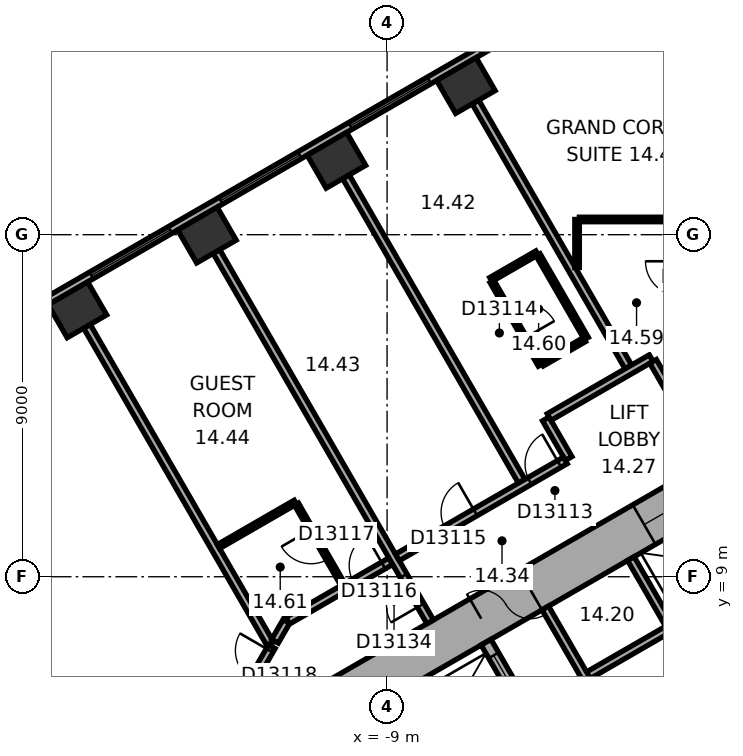
"""IFC4 building model, lengths in metres.
Left out: names, types, materials, properties, quantities, classifications, styles, units other than length and angle.
Written with IfcOpenShell. Run it as: python <this file> out.ifc"""

import sys

from ifc_helpers import new_model, si_unit, direction, frame, frame_2d, origin, origin_2d, place, context, subcontext, project, spatial, rectangle, extrude, element, fill, save


model = new_model("IFC4")
c1 = context("Model", 3, precision=1e-05, world=origin(), true_north=direction((0.0, 1.0)))
c2 = subcontext(c1, "Body", "Model", "MODEL_VIEW")
j1 = project(units=[si_unit("LENGTHUNIT", "METRE"), si_unit("PLANEANGLEUNIT", "RADIAN")], contexts=[c1])
p1 = place(None, origin())
s1 = spatial("IfcSite", under=j1, at=p1, CompositionType="ELEMENT")
p2 = place(p1, origin())
s2 = spatial("IfcBuilding", under=s1, at=p2, CompositionType="ELEMENT")
p3 = place(p2, frame((0.0, 0.0, 67.1)))
s3 = spatial("IfcBuildingStorey", under=s2, at=p3, CompositionType="ELEMENT", Elevation=67.1)
for number, where, z_axis, x_axis in (
    (1, (-6.926, 21.925, 0.0), (0.0, 0.0, 1.0), (-0.866, -0.5, 0.0)),
    (2, (-10.333, 19.957, 0.0), (0.0, 0.0, 1.0), (-0.866, -0.5, 0.0)),
    (3, (-13.74, 17.99, 0.0), (0.0, 0.0, 1.0), (-0.866, -0.5, 0.0)),
    (4, (-17.148, 16.023, 0.0), (0.0, 0.0, 1.0), (-0.866, -0.5, 0.0)),
):
    element("IfcColumn", number, at=place(p3, frame(where, z_axis=z_axis, x_axis=x_axis)), inside=s3, PredefinedType="COLUMN", context=c2, shape_type="SweptSolid", body=[
        extrude(rectangle(XDim=1.2, YDim=1.0, at=origin_2d()), origin(), (0.0, 0.0, 1.0), 3.3),
    ])
p4 = place(p3, frame((0.3, 11.836, 0.0), z_axis=(0.0, 0.0, 1.0), x_axis=(-0.866021384402, -0.500006961711, 0.0)))
e5 = element("IfcWall", 5, at=p4, inside=s3, PredefinedType="SHEAR", context=c2, shape_type="SweptSolid", body=[
    extrude(rectangle(XDim=12.355, YDim=1.2, at=frame_2d((6.178, 0.0))), origin(), (0.0, 0.0, 1.0), 3.3),
])
p5 = place(p4, frame((6.378, 0.0, 0.0)))
e6 = element("IfcOpeningElement", 6, at=p5, cuts=e5, PredefinedType="OPENING", context=c2, shape_type="SweptSolid", body=[
    extrude(rectangle(XDim=1.5, YDim=2.1, at=frame_2d((0.75, 1.05))), frame((0.0, 0.61, 0.0), z_axis=(0.0, -1.0, 0.0), x_axis=(1.0, 0.0, 0.0)), (0.0, 0.0, 1.0), 1.22),
])
p6 = place(p4, frame((1.828, 0.0, 0.0)))
e7 = element("IfcOpeningElement", 7, at=p6, cuts=e5, PredefinedType="OPENING", context=c2, shape_type="SweptSolid", body=[
    extrude(rectangle(XDim=1.1, YDim=2.1, at=frame_2d((0.55, 1.05))), frame((0.0, 0.61, 0.0), z_axis=(0.0, -1.0, 0.0), x_axis=(1.0, 0.0, 0.0)), (0.0, 0.0, 1.0), 1.22),
])
p7 = place(p3, frame((-3.136, 24.805, 0.0), z_axis=(0.0, 0.0, 1.0), x_axis=(-0.866028291626, -0.499994998079, 0.0)))
e8 = element("IfcWall", 8, at=p7, inside=s3, PredefinedType="STANDARD", context=c2, shape_type="SweptSolid", body=[
    extrude(rectangle(XDim=21.246, YDim=0.2, at=frame_2d((10.623, 0.0))), origin(), (0.0, 0.0, 1.0), 3.3),
])
p8 = place(p7, frame((1.555, 0.0, 0.8)))
e9 = element("IfcOpeningElement", 9, at=p8, cuts=e8, PredefinedType="OPENING", context=c2, shape_type="SweptSolid", body=[
    extrude(rectangle(XDim=2.4, YDim=1.7, at=frame_2d((1.2, 0.85))), frame((0.0, 0.11, 0.0), z_axis=(0.0, -1.0, 0.0), x_axis=(1.0, 0.0, 0.0)), (0.0, 0.0, 1.0), 0.22),
])
p9 = place(p7, frame((5.489, 0.0, 0.8)))
e10 = element("IfcOpeningElement", 10, at=p9, cuts=e8, PredefinedType="OPENING", context=c2, shape_type="SweptSolid", body=[
    extrude(rectangle(XDim=2.4, YDim=1.7, at=frame_2d((1.2, 0.85))), frame((0.0, 0.11, 0.0), z_axis=(0.0, -1.0, 0.0), x_axis=(1.0, 0.0, 0.0)), (0.0, 0.0, 1.0), 0.22),
])
p10 = place(p7, frame((9.424, 0.0, 0.8)))
e11 = element("IfcOpeningElement", 11, at=p10, cuts=e8, PredefinedType="OPENING", context=c2, shape_type="SweptSolid", body=[
    extrude(rectangle(XDim=2.4, YDim=1.7, at=frame_2d((1.2, 0.85))), frame((0.0, 0.11, 0.0), z_axis=(0.0, -1.0, 0.0), x_axis=(1.0, 0.0, 0.0)), (0.0, 0.0, 1.0), 0.22),
])
p11 = place(p7, frame((13.358, 0.0, 0.8)))
e12 = element("IfcOpeningElement", 12, at=p11, cuts=e8, PredefinedType="OPENING", context=c2, shape_type="SweptSolid", body=[
    extrude(rectangle(XDim=2.4, YDim=1.7, at=frame_2d((1.2, 0.85))), frame((0.0, 0.11, 0.0), z_axis=(0.0, -1.0, 0.0), x_axis=(1.0, 0.0, 0.0)), (0.0, 0.0, 1.0), 0.22),
])
p12 = place(p7, frame((17.293, 0.0, 0.8)))
e13 = element("IfcOpeningElement", 13, at=p12, cuts=e8, PredefinedType="OPENING", context=c2, shape_type="SweptSolid", body=[
    extrude(rectangle(XDim=2.4, YDim=1.7, at=frame_2d((1.2, 0.85))), frame((0.0, 0.11, 0.0), z_axis=(0.0, -1.0, 0.0), x_axis=(1.0, 0.0, 0.0)), (0.0, 0.0, 1.0), 0.22),
])
p13 = place(p3, frame((0.803, 9.009, 0.0), z_axis=(0.0, 0.0, 1.0), x_axis=(-0.866028230842, -0.499995103361, 0.0)))
e14 = element("IfcWall", 14, at=p13, inside=s3, PredefinedType="PARTITIONING", context=c2, shape_type="SweptSolid", body=[
    extrude(rectangle(XDim=5.4, YDim=0.2, at=frame_2d((2.7, 0.0))), origin(), (0.0, 0.0, 1.0), 3.05),
])
for number, where, z_axis, x_axis in (
    (15, (-1.485, 7.572, 0.0), (0.0, 0.0, 1.0), (-0.5, 0.866, 0.0)),
    (16, (-3.737, 6.272, 0.0), (0.0, 0.0, 1.0), (-0.5, 0.866, 0.0)),
):
    element("IfcWall", number, at=place(p3, frame(where, z_axis=z_axis, x_axis=x_axis)), inside=s3, PredefinedType="PARTITIONING", context=c2, shape_type="SweptSolid", body=[
        extrude(rectangle(XDim=2.2, YDim=0.2, at=frame_2d((1.1, 0.0))), origin(), (0.0, 0.0, 1.0), 3.05),
    ])
p14 = place(p3, frame((-2.216, 4.282, 0.0), z_axis=(0.0, 0.0, 1.0), x_axis=(0.499977259774, 0.866038532462, 0.0)))
e17 = element("IfcWall", 17, at=p14, inside=s3, PredefinedType="SHEAR", context=c2, shape_type="SweptSolid", body=[
    extrude(rectangle(XDim=4.7, YDim=0.3, at=frame_2d((2.35, 0.0))), origin(), (0.0, 0.0, 1.0), 3.05),
])
p15 = place(p3, frame((-5.295, 5.372, 0.0), z_axis=(0.0, 0.0, 1.0), x_axis=(-0.500077893725, 0.86598042715, 0.0)))
e18 = element("IfcWall", 18, at=p15, inside=s3, PredefinedType="SHEAR", context=c2, shape_type="SweptSolid", body=[
    extrude(rectangle(XDim=2.2, YDim=0.3, at=frame_2d((1.1, 0.0))), origin(), (0.0, 0.0, 1.0), 3.05),
])
p16 = place(p15, frame((0.7, 0.0, 0.0)))
e19 = element("IfcOpeningElement", 19, at=p16, cuts=e18, PredefinedType="OPENING", context=c2, shape_type="SweptSolid", body=[
    extrude(rectangle(XDim=1.1, YDim=2.1, at=frame_2d((0.55, 1.05))), frame((0.0, 0.16, 0.0), z_axis=(0.0, -1.0, 0.0), x_axis=(1.0, 0.0, 0.0)), (0.0, 0.0, 1.0), 0.32),
])
p17 = place(p3, frame((-16.898, 15.59, 0.0), z_axis=(0.0, 0.0, 1.0), x_axis=(0.499994742786, -0.866028439017, 0.0)))
e20 = element("IfcWall", 20, at=p17, inside=s3, PredefinedType="PARTITIONING", context=c2, shape_type="SweptSolid", body=[
    extrude(rectangle(XDim=9.65, YDim=0.2, at=frame_2d((4.825, 0.0))), origin(), (0.0, 0.0, 1.0), 3.05),
])
p18 = place(p3, frame((-13.436, 9.794, 0.0), z_axis=(0.0, 0.0, 1.0), x_axis=(0.866053246676, 0.499951771596, 0.0)))
e21 = element("IfcWall", 21, at=p18, inside=s3, PredefinedType="PARTITIONING", context=c2, shape_type="SweptSolid", body=[
    extrude(rectangle(XDim=2.335, YDim=0.12, at=frame_2d((1.167, 0.0))), origin(), (0.0, 0.0, 1.0), 3.05),
])
p19 = place(p3, frame((-12.032, 7.162, 0.0), z_axis=(0.0, 0.0, 1.0), x_axis=(-0.499951829968, -0.866053212979, 0.0)))
e22 = element("IfcWall", 22, at=p19, inside=s3, PredefinedType="PARTITIONING", context=c2, shape_type="SweptSolid", body=[
    extrude(rectangle(XDim=1.136, YDim=0.2, at=frame_2d((0.568, 0.0))), origin(), (0.0, 0.0, 1.0), 3.05),
])
p20 = place(p19, frame((0.118, 0.0, 0.0)))
e23 = element("IfcOpeningElement", 23, at=p20, cuts=e22, PredefinedType="OPENING", context=c2, shape_type="SweptSolid", body=[
    extrude(rectangle(XDim=0.9, YDim=2.1, at=frame_2d((0.45, 1.05))), frame((0.0, 0.11, 0.0), z_axis=(0.0, -1.0, 0.0), x_axis=(1.0, 0.0, 0.0)), (0.0, 0.0, 1.0), 0.22),
])
p21 = place(p3, frame((-11.65, 7.823, 0.0), z_axis=(0.0, 0.0, 1.0), x_axis=(-0.50012165622, -0.865955154139, 0.0)))
e24 = element("IfcWall", 24, at=p21, inside=s3, PredefinedType="PARTITIONING", context=c2, shape_type="SweptSolid", body=[
    extrude(rectangle(XDim=0.6, YDim=0.2, at=frame_2d((0.3, 0.0))), origin(), (0.0, 0.0, 1.0), 3.05),
])
p22 = place(p3, frame((-11.385, 10.909, 0.0), z_axis=(0.0, 0.0, 1.0), x_axis=(0.500077547548, -0.865980627057, 0.0)))
e25 = element("IfcWall", 25, at=p22, inside=s3, PredefinedType="PARTITIONING", context=c2, shape_type="SweptSolid", body=[
    extrude(rectangle(XDim=2.44, YDim=0.12, at=frame_2d((1.22, 0.0))), origin(), (0.0, 0.0, 1.0), 3.05),
])
p23 = place(p22, frame((0.77, 0.0, 0.0)))
e26 = element("IfcOpeningElement", 26, at=p23, cuts=e25, PredefinedType="OPENING", context=c2, shape_type="SweptSolid", body=[
    extrude(rectangle(XDim=0.9, YDim=2.1, at=frame_2d((0.45, 1.05))), frame((0.0, 0.07, 0.0), z_axis=(0.0, -1.0, 0.0), x_axis=(1.0, 0.0, 0.0)), (0.0, 0.0, 1.0), 0.14),
])
p24 = place(p3, frame((-10.083, 19.524, 0.0), z_axis=(0.0, 0.0, 1.0), x_axis=(0.499999662836, -0.866025598446, 0.0)))
e27 = element("IfcWall", 27, at=p24, inside=s3, PredefinedType="PARTITIONING", context=c2, shape_type="SweptSolid", body=[
    extrude(rectangle(XDim=9.25, YDim=0.2, at=frame_2d((4.625, 0.0))), origin(), (0.0, 0.0, 1.0), 2.6),
])
p25 = place(p3, frame((-8.902, 9.41, 0.0), z_axis=(0.0, 0.0, 1.0), x_axis=(-0.866014299198, -0.500019233215, 0.0)))
e28 = element("IfcWall", 28, at=p25, inside=s3, PredefinedType="PARTITIONING", context=c2, shape_type="SweptSolid", body=[
    extrude(rectangle(XDim=3.133, YDim=0.2, at=frame_2d((1.567, 0.0))), origin(), (0.0, 0.0, 1.0), 3.05),
])
p26 = place(p25, frame((0.225, 0.0, 0.0)))
e29 = element("IfcOpeningElement", 29, at=p26, cuts=e28, PredefinedType="OPENING", context=c2, shape_type="SweptSolid", body=[
    extrude(rectangle(XDim=0.9, YDim=2.1, at=frame_2d((0.45, 1.05))), frame((0.0, 0.11, 0.0), z_axis=(0.0, -1.0, 0.0), x_axis=(1.0, 0.0, 0.0)), (0.0, 0.0, 1.0), 0.22),
])
p27 = place(p3, frame((-7.865, 7.814, 0.0), z_axis=(0.0, 0.0, 1.0), x_axis=(-0.500004234368, 0.866022959057, 0.0)))
e30 = element("IfcWall", 30, at=p27, inside=s3, PredefinedType="PARTITIONING", context=c2, shape_type="SweptSolid", body=[
    extrude(rectangle(XDim=11.25, YDim=0.2, at=frame_2d((5.625, 0.0))), origin(), (0.0, 0.0, 1.0), 3.05),
])
p28 = place(p27, frame((0.5, 0.0, 0.0)))
e31 = element("IfcOpeningElement", 31, at=p28, cuts=e30, PredefinedType="OPENING", context=c2, shape_type="SweptSolid", body=[
    extrude(rectangle(XDim=0.9, YDim=2.1, at=frame_2d((0.45, 1.05))), frame((0.0, 0.11, 0.0), z_axis=(0.0, -1.0, 0.0), x_axis=(1.0, 0.0, 0.0)), (0.0, 0.0, 1.0), 0.22),
])
p29 = place(p3, frame((-6.676, 21.492, 0.0), z_axis=(0.0, 0.0, 1.0), x_axis=(0.500011263043, -0.866018900966, 0.0)))
e32 = element("IfcWall", 32, at=p29, inside=s3, PredefinedType="PARTITIONING", context=c2, shape_type="SweptSolid", body=[
    extrude(rectangle(XDim=8.049, YDim=0.2, at=frame_2d((4.024, 0.0))), origin(), (0.0, 0.0, 1.0), 3.05),
])
p30 = place(p3, frame((-6.268, 16.82, 0.0), z_axis=(0.0, 0.0, 1.0), x_axis=(0.866002662425, 0.500039387122, 0.0)))
e33 = element("IfcWall", 33, at=p30, inside=s3, PredefinedType="PARTITIONING", context=c2, shape_type="SweptSolid", body=[
    extrude(rectangle(XDim=1.4, YDim=0.12, at=frame_2d((0.7, 0.0))), origin(), (0.0, 0.0, 1.0), 3.05),
])
p31 = place(p3, frame((-5.026, 17.469, 0.0), z_axis=(0.0, 0.0, 1.0), x_axis=(0.500005339912, -0.866022320763, 0.0)))
e34 = element("IfcWall", 34, at=p31, inside=s3, PredefinedType="PARTITIONING", context=c2, shape_type="SweptSolid", body=[
    extrude(rectangle(XDim=2.54, YDim=0.12, at=frame_2d((1.27, 0.0))), origin(), (0.0, 0.0, 1.0), 3.05),
])
p32 = place(p3, frame((-4.968, 14.569, 0.0), z_axis=(0.0, 0.0, 1.0), x_axis=(-0.500046963369, 0.865998287773, 0.0)))
e35 = element("IfcWall", 35, at=p32, inside=s3, PredefinedType="PARTITIONING", context=c2, shape_type="SweptSolid", body=[
    extrude(rectangle(XDim=2.54, YDim=0.12, at=frame_2d((1.27, 0.0))), origin(), (0.0, 0.0, 1.0), 3.05),
])
p33 = place(p32, frame((0.82, 0.0, 0.0)))
e36 = element("IfcOpeningElement", 36, at=p33, cuts=e35, PredefinedType="OPENING", context=c2, shape_type="SweptSolid", body=[
    extrude(rectangle(XDim=0.9, YDim=2.1, at=frame_2d((0.45, 1.05))), frame((0.0, 0.07, 0.0), z_axis=(0.0, -1.0, 0.0), x_axis=(1.0, 0.0, 0.0)), (0.0, 0.0, 1.0), 0.14),
])
p34 = place(p3, frame((-4.823, 13.152, 0.0), z_axis=(0.0, 0.0, 1.0), x_axis=(0.499986357472, -0.866033280158, 0.0)))
e37 = element("IfcWall", 37, at=p34, inside=s3, PredefinedType="PARTITIONING", context=c2, shape_type="SweptSolid", body=[
    extrude(rectangle(XDim=1.201, YDim=0.2, at=frame_2d((0.601, 0.0))), origin(), (0.0, 0.0, 1.0), 3.05),
])
p35 = place(p3, frame((-4.309, 12.061, 0.0), z_axis=(0.0, 0.0, 1.0), x_axis=(-0.866020679205, -0.500008183122, 0.0)))
e38 = element("IfcWall", 38, at=p35, inside=s3, PredefinedType="PARTITIONING", context=c2, shape_type="SweptSolid", body=[
    extrude(rectangle(XDim=5.104, YDim=0.2, at=frame_2d((2.552, 0.0))), origin(), (0.0, 0.0, 1.0), 3.05),
])
p36 = place(p35, frame((0.185, 0.0, 0.0)))
e39 = element("IfcOpeningElement", 39, at=p36, cuts=e38, PredefinedType="OPENING", context=c2, shape_type="SweptSolid", body=[
    extrude(rectangle(XDim=0.9, YDim=2.1, at=frame_2d((0.45, 1.05))), frame((0.0, 0.11, 0.0), z_axis=(0.0, -1.0, 0.0), x_axis=(1.0, 0.0, 0.0)), (0.0, 0.0, 1.0), 0.22),
])
p37 = place(p35, frame((2.736, 0.0, 0.0)))
e40 = element("IfcOpeningElement", 40, at=p37, cuts=e38, PredefinedType="OPENING", context=c2, shape_type="SweptSolid", body=[
    extrude(rectangle(XDim=0.9, YDim=2.1, at=frame_2d((0.45, 1.05))), frame((0.0, 0.11, 0.0), z_axis=(0.0, -1.0, 0.0), x_axis=(1.0, 0.0, 0.0)), (0.0, 0.0, 1.0), 0.22),
])
p38 = place(p3, frame((-4.0, 17.137, 0.0), z_axis=(0.0, 0.0, 1.0), x_axis=(0.0, 1.0, 0.0)))
e41 = element("IfcWall", 41, at=p38, inside=s3, PredefinedType="PARTITIONING", context=c2, shape_type="SweptSolid", body=[
    extrude(rectangle(XDim=1.263, YDim=0.12, at=frame_2d((0.632, 0.0))), origin(), (0.0, 0.0, 1.0), 3.05),
])
p39 = place(p3, frame((-3.94, 18.401, 0.0), z_axis=(0.0, 0.0, 1.0), x_axis=(1.0, 0.0, 0.0)))
e42 = element("IfcWall", 42, at=p39, inside=s3, PredefinedType="PARTITIONING", context=c2, shape_type="SweptSolid", body=[
    extrude(rectangle(XDim=2.64, YDim=0.12, at=frame_2d((1.32, 0.0))), origin(), (0.0, 0.0, 1.0), 3.05),
])
p40 = place(p3, frame((-3.808, 15.239, 0.0), z_axis=(0.0, 0.0, 1.0), x_axis=(-0.866087136806, -0.499893060024, 0.0)))
e43 = element("IfcWall", 43, at=p40, inside=s3, PredefinedType="PARTITIONING", context=c2, shape_type="SweptSolid", body=[
    extrude(rectangle(XDim=1.28, YDim=0.12, at=frame_2d((0.64, 0.0))), origin(), (0.0, 0.0, 1.0), 3.05),
])
p41 = place(p3, frame((-2.05, 14.752, 0.0), z_axis=(0.0, 0.0, 1.0), x_axis=(-0.866030936828, -0.499990416364, 0.0)))
e44 = element("IfcWall", 44, at=p41, inside=s3, PredefinedType="PARTITIONING", context=c2, shape_type="SweptSolid", body=[
    extrude(rectangle(XDim=3.102, YDim=0.2, at=frame_2d((1.551, 0.0))), origin(), (0.0, 0.0, 1.0), 3.05),
])
p42 = place(p3, frame((-1.449, 13.712, 0.0), z_axis=(0.0, 0.0, 1.0), x_axis=(-0.499978356969, 0.866037899034, 0.0)))
e45 = element("IfcWall", 45, at=p42, inside=s3, PredefinedType="PARTITIONING", context=c2, shape_type="SweptSolid", body=[
    extrude(rectangle(XDim=1.101, YDim=0.2, at=frame_2d((0.551, 0.0))), origin(), (0.0, 0.0, 1.0), 3.05),
])
p43 = place(p3, frame((-1.3, 15.301, 0.0), z_axis=(0.0, 0.0, 1.0), x_axis=(-1.0, 0.0, 0.0)))
e46 = element("IfcWall", 46, at=p43, inside=s3, PredefinedType="PARTITIONING", context=c2, shape_type="SweptSolid", body=[
    extrude(rectangle(XDim=1.661, YDim=0.12, at=frame_2d((0.831, 0.0))), origin(), (0.0, 0.0, 1.0), 3.05),
])
p44 = place(p9, origin())
e47 = element("IfcWindow", 47, at=p44, inside=s3, PartitioningType="SINGLE_PANEL", PredefinedType="WINDOW", context=c2, shape_type="SweptSolid", body=[
    extrude(rectangle(XDim=2.4, YDim=1.7, at=frame_2d((1.2, 0.85))), frame((0.0, 0.03, 0.0), z_axis=(0.0, -1.0, 0.0), x_axis=(1.0, 0.0, 0.0)), (0.0, 0.0, 1.0), 0.06),
])
fill(e10, e47)
p45 = place(p10, origin())
e48 = element("IfcWindow", 48, at=p45, inside=s3, PartitioningType="SINGLE_PANEL", PredefinedType="WINDOW", context=c2, shape_type="SweptSolid", body=[
    extrude(rectangle(XDim=2.4, YDim=1.7, at=frame_2d((1.2, 0.85))), frame((0.0, 0.03, 0.0), z_axis=(0.0, -1.0, 0.0), x_axis=(1.0, 0.0, 0.0)), (0.0, 0.0, 1.0), 0.06),
])
fill(e11, e48)
p46 = place(p11, origin())
e49 = element("IfcWindow", 49, at=p46, inside=s3, PartitioningType="SINGLE_PANEL", PredefinedType="WINDOW", context=c2, shape_type="SweptSolid", body=[
    extrude(rectangle(XDim=2.4, YDim=1.7, at=frame_2d((1.2, 0.85))), frame((0.0, 0.03, 0.0), z_axis=(0.0, -1.0, 0.0), x_axis=(1.0, 0.0, 0.0)), (0.0, 0.0, 1.0), 0.06),
])
fill(e12, e49)
p47 = place(p5, origin())
e50 = element("IfcDoor", 50, at=p47, inside=s3, OperationType="DOUBLE_DOOR_SINGLE_SWING", PredefinedType="DOOR", context=c2, shape_type="SweptSolid", body=[
    extrude(rectangle(XDim=1.5, YDim=2.1, at=frame_2d((0.75, 1.05))), frame((0.0, 0.025, 0.0), z_axis=(0.0, -1.0, 0.0), x_axis=(1.0, 0.0, 0.0)), (0.0, 0.0, 1.0), 0.05),
])
fill(e6, e50)
p48 = place(p16, origin())
e51 = element("IfcDoor", 51, at=p48, inside=s3, OperationType="DOUBLE_DOOR_SLIDING", PredefinedType="DOOR", context=c2, shape_type="SweptSolid", body=[
    extrude(rectangle(XDim=1.1, YDim=2.1, at=frame_2d((0.55, 1.05))), frame((0.0, 0.025, 0.0), z_axis=(0.0, -1.0, 0.0), x_axis=(1.0, 0.0, 0.0)), (0.0, 0.0, 1.0), 0.05),
])
fill(e19, e51)
p49 = place(p6, origin())
e52 = element("IfcDoor", 52, at=p49, inside=s3, OperationType="DOUBLE_DOOR_SLIDING", PredefinedType="DOOR", context=c2, shape_type="SweptSolid", body=[
    extrude(rectangle(XDim=1.1, YDim=2.1, at=frame_2d((0.55, 1.05))), frame((0.0, 0.025, 0.0), z_axis=(0.0, -1.0, 0.0), x_axis=(1.0, 0.0, 0.0)), (0.0, 0.0, 1.0), 0.05),
])
fill(e7, e52)
p50 = place(p36, origin())
e53 = element("IfcDoor", 53, at=p50, inside=s3, OperationType="SINGLE_SWING_LEFT", PredefinedType="DOOR", context=c2, shape_type="SweptSolid", body=[
    extrude(rectangle(XDim=0.9, YDim=2.1, at=frame_2d((0.45, 1.05))), frame((0.0, 0.025, 0.0), z_axis=(0.0, -1.0, 0.0), x_axis=(1.0, 0.0, 0.0)), (0.0, 0.0, 1.0), 0.05),
])
fill(e39, e53)
p51 = place(p33, origin())
e54 = element("IfcDoor", 54, at=p51, inside=s3, OperationType="SINGLE_SWING_LEFT", PredefinedType="DOOR", context=c2, shape_type="SweptSolid", body=[
    extrude(rectangle(XDim=0.9, YDim=2.1, at=frame_2d((0.45, 1.05))), frame((0.0, 0.025, 0.0), z_axis=(0.0, -1.0, 0.0), x_axis=(1.0, 0.0, 0.0)), (0.0, 0.0, 1.0), 0.05),
])
fill(e36, e54)
p52 = place(p37, origin())
e55 = element("IfcDoor", 55, at=p52, inside=s3, OperationType="SINGLE_SWING_LEFT", PredefinedType="DOOR", context=c2, shape_type="SweptSolid", body=[
    extrude(rectangle(XDim=0.9, YDim=2.1, at=frame_2d((0.45, 1.05))), frame((0.0, 0.025, 0.0), z_axis=(0.0, -1.0, 0.0), x_axis=(1.0, 0.0, 0.0)), (0.0, 0.0, 1.0), 0.05),
])
fill(e40, e55)
p53 = place(p26, origin())
e56 = element("IfcDoor", 56, at=p53, inside=s3, OperationType="SINGLE_SWING_LEFT", PredefinedType="DOOR", context=c2, shape_type="SweptSolid", body=[
    extrude(rectangle(XDim=0.9, YDim=2.1, at=frame_2d((0.45, 1.05))), frame((0.0, 0.025, 0.0), z_axis=(0.0, -1.0, 0.0), x_axis=(1.0, 0.0, 0.0)), (0.0, 0.0, 1.0), 0.05),
])
fill(e29, e56)
p54 = place(p23, origin())
e57 = element("IfcDoor", 57, at=p54, inside=s3, OperationType="SINGLE_SWING_LEFT", PredefinedType="DOOR", context=c2, shape_type="SweptSolid", body=[
    extrude(rectangle(XDim=0.9, YDim=2.1, at=frame_2d((0.45, 1.05))), frame((0.0, 0.025, 0.0), z_axis=(0.0, -1.0, 0.0), x_axis=(1.0, 0.0, 0.0)), (0.0, 0.0, 1.0), 0.05),
])
fill(e26, e57)
p55 = place(p20, origin())
e58 = element("IfcDoor", 58, at=p55, inside=s3, OperationType="SINGLE_SWING_LEFT", PredefinedType="DOOR", context=c2, shape_type="SweptSolid", body=[
    extrude(rectangle(XDim=0.9, YDim=2.1, at=frame_2d((0.45, 1.05))), frame((0.0, 0.025, 0.0), z_axis=(0.0, -1.0, 0.0), x_axis=(1.0, 0.0, 0.0)), (0.0, 0.0, 1.0), 0.05),
])
fill(e23, e58)
p56 = place(p28, origin())
e59 = element("IfcDoor", 59, at=p56, inside=s3, OperationType="SINGLE_SWING_LEFT", PredefinedType="DOOR", context=c2, shape_type="SweptSolid", body=[
    extrude(rectangle(XDim=0.9, YDim=2.1, at=frame_2d((0.45, 1.05))), frame((0.0, 0.025, 0.0), z_axis=(0.0, -1.0, 0.0), x_axis=(1.0, 0.0, 0.0)), (0.0, 0.0, 1.0), 0.05),
])
fill(e31, e59)
save(model, sys.argv[1])
